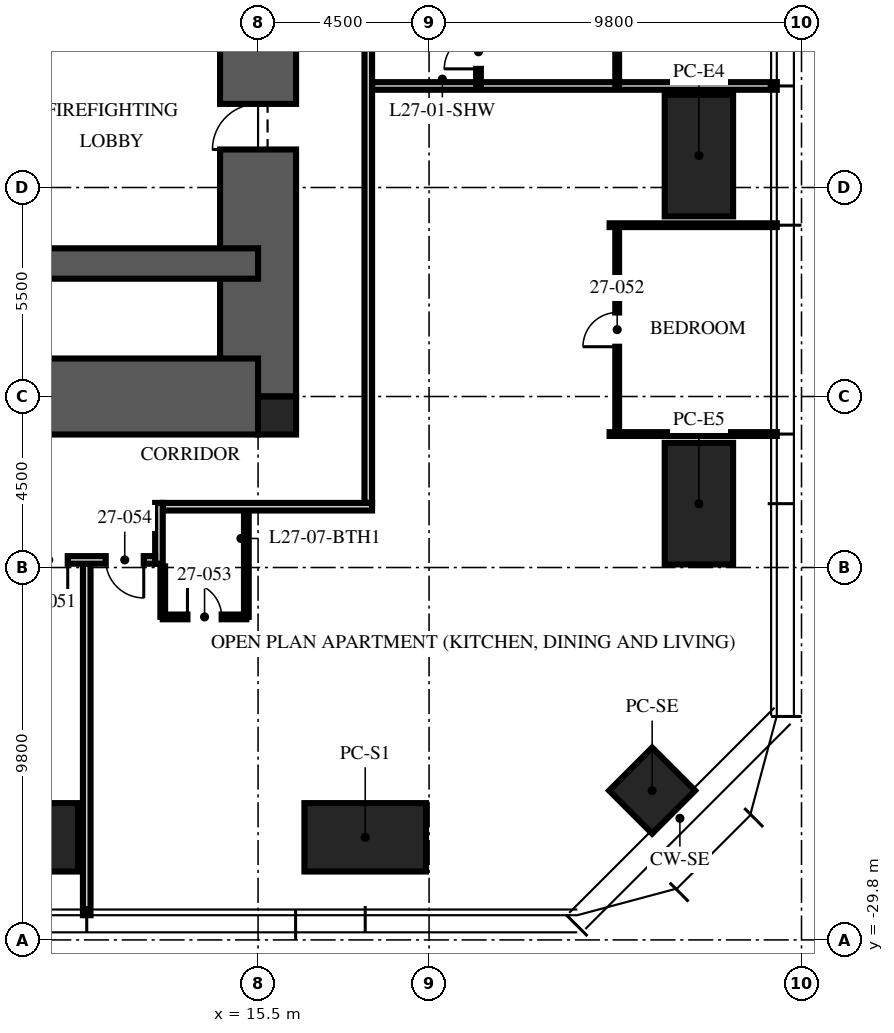
"""IFC4 building model, lengths in metres.
Left out: names, types, materials, properties, quantities, classifications, styles, units other than length and angle.
Written with IfcOpenShell. Run it as: python <this file> out.ifc"""

import sys

from ifc_helpers import new_model, si_unit, direction, frame, frame_2d, origin, origin_2d, place, context, subcontext, project, spatial, rectangle, hollow_rectangle, extrude, element, fill, save


model = new_model("IFC4")
c1 = context("Model", 3, precision=1e-05, world=origin(), true_north=direction((0.0, 1.0)))
c2 = subcontext(c1, "Body", "Model", "MODEL_VIEW")
j1 = project(units=[si_unit("LENGTHUNIT", "METRE"), si_unit("PLANEANGLEUNIT", "RADIAN")], contexts=[c1])
p1 = place(None, origin())
s1 = spatial("IfcSite", under=j1, at=p1, CompositionType="ELEMENT")
p2 = place(p1, origin())
s2 = spatial("IfcBuilding", under=s1, at=p2, CompositionType="ELEMENT")
p3 = place(p2, frame((0.0, 0.0, 111.0)))
s3 = spatial("IfcBuildingStorey", under=s2, at=p3, CompositionType="ELEMENT", Elevation=111.0)
p4 = place(p3, frame((15.5, -15.5, -0.25), z_axis=(0.0, 0.0, 1.0), x_axis=(0.0, 1.0, 0.0)))
e1 = element("IfcWall", 1, at=p4, inside=s3, PredefinedType="SHEAR", context=c2, shape_type="SweptSolid", body=[
    extrude(rectangle(XDim=31.0, YDim=2.0, at=frame_2d((15.5, 0.0))), origin(), (0.0, 0.0, 1.0), 3.75),
])
p5 = place(p4, frame((6.5, 0.0, 0.25)))
e2 = element("IfcOpeningElement", 2, at=p5, cuts=e1, PredefinedType="OPENING", context=c2, shape_type="SweptSolid", body=[
    extrude(rectangle(XDim=1.2, YDim=2.1, at=frame_2d((0.6, 1.05))), frame((0.0, 1.01, 0.0), z_axis=(0.0, -1.0, 0.0), x_axis=(1.0, 0.0, 0.0)), (0.0, 0.0, 1.0), 2.02),
])
p6 = place(p4, frame((23.0, 0.0, 0.25)))
e3 = element("IfcOpeningElement", 3, at=p6, cuts=e1, PredefinedType="OPENING", context=c2, shape_type="SweptSolid", body=[
    extrude(rectangle(XDim=1.8, YDim=2.1, at=frame_2d((0.9, 1.05))), frame((0.0, 1.01, 0.0), z_axis=(0.0, -1.0, 0.0), x_axis=(1.0, 0.0, 0.0)), (0.0, 0.0, 1.0), 2.02),
])
p7 = place(p3, frame((-15.5, -15.5, -0.25), z_axis=(0.0, 0.0, 1.0), x_axis=(1.0, 0.0, 0.0)))
e4 = element("IfcWall", 4, at=p7, inside=s3, PredefinedType="SHEAR", context=c2, shape_type="SweptSolid", body=[
    extrude(rectangle(XDim=31.0, YDim=2.0, at=frame_2d((15.5, 0.0))), origin(), (0.0, 0.0, 1.0), 3.75),
])
p8 = place(p7, frame((10.4, 0.0, 0.25)))
e5 = element("IfcOpeningElement", 5, at=p8, cuts=e4, PredefinedType="OPENING", context=c2, shape_type="SweptSolid", body=[
    extrude(rectangle(XDim=1.1, YDim=2.1, at=frame_2d((0.55, 1.05))), frame((0.0, 1.01, 0.0), z_axis=(0.0, -1.0, 0.0), x_axis=(1.0, 0.0, 0.0)), (0.0, 0.0, 1.0), 2.02),
])
p9 = place(p7, frame((13.5, 0.0, 0.25)))
e6 = element("IfcOpeningElement", 6, at=p9, cuts=e4, PredefinedType="OPENING", context=c2, shape_type="SweptSolid", body=[
    extrude(rectangle(XDim=1.1, YDim=2.1, at=frame_2d((0.55, 1.05))), frame((0.0, 1.01, 0.0), z_axis=(0.0, -1.0, 0.0), x_axis=(1.0, 0.0, 0.0)), (0.0, 0.0, 1.0), 2.02),
])
p10 = place(p7, frame((16.6, 0.0, 0.25)))
e7 = element("IfcOpeningElement", 7, at=p10, cuts=e4, PredefinedType="OPENING", context=c2, shape_type="SweptSolid", body=[
    extrude(rectangle(XDim=1.1, YDim=2.1, at=frame_2d((0.55, 1.05))), frame((0.0, 1.01, 0.0), z_axis=(0.0, -1.0, 0.0), x_axis=(1.0, 0.0, 0.0)), (0.0, 0.0, 1.0), 2.02),
])
p11 = place(p3, frame((-15.5, -12.0, -0.25), z_axis=(0.0, 0.0, 1.0), x_axis=(1.0, 0.0, 0.0)))
e8 = element("IfcWall", 8, at=p11, inside=s3, PredefinedType="SHEAR", context=c2, shape_type="SweptSolid", body=[
    extrude(rectangle(XDim=31.0, YDim=0.8, at=frame_2d((15.5, 0.0))), origin(), (0.0, 0.0, 1.0), 3.75),
])
p12 = place(p3, frame((16.0, -16.0, -0.25), z_axis=(0.0, 0.0, 1.0), x_axis=(1.0, 0.0, 0.0)))
e9 = element("IfcColumn", 9, at=p12, inside=s3, PredefinedType="COLUMN", context=c2, shape_type="SweptSolid", body=[
    extrude(rectangle(XDim=1.0, YDim=1.0, at=origin_2d()), origin(), (0.0, 0.0, 1.0), 3.75),
])
for number, where, z_axis, x_axis in (
    (10, (27.1, -9.16, 0.0), (0.0, 0.0, 1.0), (0.0, 1.0, 0.0)),
    (11, (27.1, -18.32, 0.0), (0.0, 0.0, 1.0), (0.0, 1.0, 0.0)),
    (12, (18.32, -27.1, 0.0), (0.0, 0.0, 1.0), (1.0, 0.0, 0.0)),
    (13, (9.16, -27.1, 0.0), (0.0, 0.0, 1.0), (1.0, 0.0, 0.0)),
):
    element("IfcColumn", number, at=place(p3, frame(where, z_axis=z_axis, x_axis=x_axis)), inside=s3, PredefinedType="COLUMN", context=c2, shape_type="SweptSolid", body=[
        extrude(hollow_rectangle(XDim=3.2, YDim=1.8, WallThickness=0.2, at=origin_2d()), origin(), (0.0, 0.0, 1.0), 3.75),
    ])
p13 = place(p3, frame((25.87, -25.87, 0.0), z_axis=(0.0, 0.0, 1.0), x_axis=(0.707106781187, 0.707106781187, 0.0)))
e14 = element("IfcColumn", 14, at=p13, inside=s3, PredefinedType="COLUMN", context=c2, shape_type="SweptSolid", body=[
    extrude(hollow_rectangle(XDim=1.6, YDim=1.6, WallThickness=0.1, at=origin_2d()), origin(), (0.0, 0.0, 1.0), 3.75),
])
p14 = place(p3, frame((18.5, -7.328, 0.0), z_axis=(0.0, 0.0, 1.0), x_axis=(1.0, 0.0, 0.0)))
e15 = element("IfcWall", 15, at=p14, inside=s3, PredefinedType="PARTITIONING", context=c2, shape_type="SweptSolid", body=[
    extrude(rectangle(XDim=10.65, YDim=0.2, at=frame_2d((5.325, 0.0))), origin(), (0.0, 0.0, 1.0), 2.81),
])
p15 = place(p3, frame((10.992, -19.9, 0.0), z_axis=(0.0, 0.0, 1.0), x_axis=(0.0, -1.0, 0.0)))
e16 = element("IfcWall", 16, at=p15, inside=s3, PredefinedType="PARTITIONING", context=c2, shape_type="SweptSolid", body=[
    extrude(rectangle(XDim=9.25, YDim=0.2, at=frame_2d((4.625, 0.0))), origin(), (0.0, 0.0, 1.0), 2.81),
])
for number, where, z_axis, x_axis in (
    (17, (24.75, -16.488, 0.0), (0.0, 0.0, 1.0), (1.0, 0.0, 0.0)),
    (18, (24.75, -10.992, 0.0), (0.0, 0.0, 1.0), (1.0, 0.0, 0.0)),
):
    element("IfcWall", number, at=place(p3, frame(where, z_axis=z_axis, x_axis=x_axis)), inside=s3, PredefinedType="PARTITIONING", context=c2, shape_type="SweptSolid", body=[
        extrude(rectangle(XDim=4.4, YDim=0.1, at=frame_2d((2.2, 0.0))), origin(), (0.0, 0.0, 1.0), 2.81),
    ])
p16 = place(p3, frame((24.95, -7.328, 0.0), z_axis=(0.0, 0.0, 1.0), x_axis=(0.0, 1.0, 0.0)))
e19 = element("IfcWall", 19, at=p16, inside=s3, PredefinedType="PARTITIONING", context=c2, shape_type="SweptSolid", body=[
    extrude(rectangle(XDim=5.496, YDim=0.1, at=frame_2d((2.748, 0.0))), origin(), (0.0, 0.0, 1.0), 2.81),
])
p17 = place(p16, frame((2.298, 0.0, 0.0)))
e20 = element("IfcOpeningElement", 20, at=p17, cuts=e19, PredefinedType="OPENING", context=c2, shape_type="SweptSolid", body=[
    extrude(rectangle(XDim=0.9, YDim=2.1, at=frame_2d((0.45, 1.05))), frame((0.0, 0.06, 0.0), z_axis=(0.0, -1.0, 0.0), x_axis=(1.0, 0.0, 0.0)), (0.0, 0.0, 1.0), 0.12),
])
p18 = place(p3, frame((21.3, -7.328, 0.0), z_axis=(0.0, 0.0, 1.0), x_axis=(0.0, 1.0, 0.0)))
e21 = element("IfcWall", 21, at=p18, inside=s3, PredefinedType="PARTITIONING", context=c2, shape_type="SweptSolid", body=[
    extrude(rectangle(XDim=1.8, YDim=0.125, at=frame_2d((0.9, 0.0))), origin(), (0.0, 0.0, 1.0), 3.5),
])
p19 = place(p18, frame((0.45, 0.0, 0.0)))
e22 = element("IfcOpeningElement", 22, at=p19, cuts=e21, PredefinedType="OPENING", context=c2, shape_type="SweptSolid", body=[
    extrude(rectangle(XDim=0.9, YDim=2.1, at=frame_2d((0.45, 1.05))), frame((0.0, 0.073, 0.0), z_axis=(0.0, -1.0, 0.0), x_axis=(1.0, 0.0, 0.0)), (0.0, 0.0, 1.0), 0.145),
])
p20 = place(p3, frame((24.95, -16.488, 0.0), z_axis=(0.0, 0.0, 1.0), x_axis=(0.0, 1.0, 0.0)))
e23 = element("IfcWall", 23, at=p20, inside=s3, PredefinedType="PARTITIONING", context=c2, shape_type="SweptSolid", body=[
    extrude(rectangle(XDim=5.496, YDim=0.1, at=frame_2d((2.748, 0.0))), origin(), (0.0, 0.0, 1.0), 2.81),
])
p21 = place(p20, frame((2.298, 0.0, 0.0)))
e24 = element("IfcOpeningElement", 24, at=p21, cuts=e23, PredefinedType="OPENING", context=c2, shape_type="SweptSolid", body=[
    extrude(rectangle(XDim=0.9, YDim=2.1, at=frame_2d((0.45, 1.05))), frame((0.0, 0.06, 0.0), z_axis=(0.0, -1.0, 0.0), x_axis=(1.0, 0.0, 0.0)), (0.0, 0.0, 1.0), 0.12),
])
p22 = place(p3, frame((12.992, -21.3, 0.0), z_axis=(0.0, 0.0, 1.0), x_axis=(1.0, 0.0, 0.0)))
e25 = element("IfcWall", 25, at=p22, inside=s3, PredefinedType="PARTITIONING", context=c2, shape_type="SweptSolid", body=[
    extrude(rectangle(XDim=2.2, YDim=0.125, at=frame_2d((1.1, 0.0))), origin(), (0.0, 0.0, 1.0), 2.81),
])
p23 = place(p22, frame((0.65, 0.0, 0.0)))
e26 = element("IfcOpeningElement", 26, at=p23, cuts=e25, PredefinedType="OPENING", context=c2, shape_type="SweptSolid", body=[
    extrude(rectangle(XDim=0.9, YDim=2.1, at=frame_2d((0.45, 1.05))), frame((0.0, 0.073, 0.0), z_axis=(0.0, -1.0, 0.0), x_axis=(1.0, 0.0, 0.0)), (0.0, 0.0, 1.0), 0.145),
])
p24 = place(p3, frame((12.992, -19.97, 0.0), z_axis=(0.0, 0.0, 1.0), x_axis=(0.0, -1.0, 0.0)))
e27 = element("IfcWall", 27, at=p24, inside=s3, PredefinedType="PARTITIONING", context=c2, shape_type="SweptSolid", body=[
    extrude(rectangle(XDim=1.33, YDim=0.125, at=frame_2d((0.665, 0.0))), origin(), (0.0, 0.0, 1.0), 3.5),
])
p25 = place(p3, frame((15.192, -18.5, 0.0), z_axis=(0.0, 0.0, 1.0), x_axis=(0.0, -1.0, 0.0)))
e28 = element("IfcWall", 28, at=p25, inside=s3, PredefinedType="PARTITIONING", context=c2, shape_type="SweptSolid", body=[
    extrude(rectangle(XDim=2.8, YDim=0.125, at=frame_2d((1.4, 0.0))), origin(), (0.0, 0.0, 1.0), 3.5),
])
p26 = place(p3, frame((18.4, -18.3, 0.0), z_axis=(0.0, 0.0, 1.0), x_axis=(0.0, 1.0, 0.0)))
e29 = element("IfcWall", 29, at=p26, inside=s3, PredefinedType="PARTITIONING", context=c2, shape_type="SweptSolid", body=[
    extrude(rectangle(XDim=27.292, YDim=0.2, at=frame_2d((13.646, 0.0))), origin(), (0.0, 0.0, 1.0), 2.3),
])
p27 = place(p3, frame((18.5, -18.4, 0.0), z_axis=(0.0, 0.0, 1.0), x_axis=(-1.0, 0.0, 0.0)))
e30 = element("IfcWall", 30, at=p27, inside=s3, PredefinedType="PARTITIONING", context=c2, shape_type="SweptSolid", body=[
    extrude(rectangle(XDim=5.508, YDim=0.2, at=frame_2d((2.754, 0.0))), origin(), (0.0, 0.0, 1.0), 2.3),
])
p28 = place(p3, frame((12.892, -18.3, 0.0), z_axis=(0.0, 0.0, 1.0), x_axis=(0.0, -1.0, 0.0)))
e31 = element("IfcWall", 31, at=p28, inside=s3, PredefinedType="PARTITIONING", context=c2, shape_type="SweptSolid", body=[
    extrude(rectangle(XDim=1.6, YDim=0.2, at=frame_2d((0.8, 0.0))), origin(), (0.0, 0.0, 1.0), 3.5),
])
p29 = place(p3, frame((12.792, -19.8, 0.0), z_axis=(0.0, 0.0, 1.0), x_axis=(-1.0, 0.0, 0.0)))
e32 = element("IfcWall", 32, at=p29, inside=s3, PredefinedType="PARTITIONING", context=c2, shape_type="SweptSolid", body=[
    extrude(rectangle(XDim=3.6, YDim=0.2, at=frame_2d((1.8, 0.0))), origin(), (0.0, 0.0, 1.0), 2.7),
])
p30 = place(p29, frame((2.3, 0.0, 0.0)))
e33 = element("IfcOpeningElement", 33, at=p30, cuts=e32, PredefinedType="OPENING", context=c2, shape_type="SweptSolid", body=[
    extrude(rectangle(XDim=1.0, YDim=2.2, at=frame_2d((0.5, 1.1))), frame((0.0, 0.11, 0.0), z_axis=(0.0, -1.0, 0.0), x_axis=(1.0, 0.0, 0.0)), (0.0, 0.0, 1.0), 0.22),
])
p31 = place(p29, frame((0.3, 0.0, 0.0)))
e34 = element("IfcOpeningElement", 34, at=p31, cuts=e32, PredefinedType="OPENING", context=c2, shape_type="SweptSolid", body=[
    extrude(rectangle(XDim=1.0, YDim=2.2, at=frame_2d((0.5, 1.1))), frame((0.0, 0.11, 0.0), z_axis=(0.0, -1.0, 0.0), x_axis=(1.0, 0.0, 0.0)), (0.0, 0.0, 1.0), 0.22),
])
p32 = place(p5, origin())
e35 = element("IfcDoor", 35, at=p32, inside=s3, OperationType="SINGLE_SWING_LEFT", PredefinedType="DOOR", context=c2, shape_type="SweptSolid", body=[
    extrude(rectangle(XDim=1.2, YDim=2.1, at=frame_2d((0.6, 1.05))), frame((0.0, 0.025, 0.0), z_axis=(0.0, -1.0, 0.0), x_axis=(1.0, 0.0, 0.0)), (0.0, 0.0, 1.0), 0.05),
])
fill(e2, e35)
p33 = place(p19, origin())
e36 = element("IfcDoor", 36, at=p33, inside=s3, OperationType="SINGLE_SWING_LEFT", PredefinedType="DOOR", context=c2, shape_type="SweptSolid", body=[
    extrude(rectangle(XDim=0.9, YDim=2.1, at=frame_2d((0.45, 1.05))), frame((0.0, 0.025, 0.0), z_axis=(0.0, -1.0, 0.0), x_axis=(1.0, 0.0, 0.0)), (0.0, 0.0, 1.0), 0.05),
])
fill(e22, e36)
p34 = place(p30, origin())
e37 = element("IfcDoor", 37, at=p34, inside=s3, OperationType="SINGLE_SWING_LEFT", PredefinedType="DOOR", context=c2, shape_type="SweptSolid", body=[
    extrude(rectangle(XDim=1.0, YDim=2.2, at=frame_2d((0.5, 1.1))), frame((0.0, 0.025, 0.0), z_axis=(0.0, -1.0, 0.0), x_axis=(1.0, 0.0, 0.0)), (0.0, 0.0, 1.0), 0.05),
])
fill(e33, e37)
p35 = place(p21, origin())
e38 = element("IfcDoor", 38, at=p35, inside=s3, OperationType="SINGLE_SWING_LEFT", PredefinedType="DOOR", context=c2, shape_type="SweptSolid", body=[
    extrude(rectangle(XDim=0.9, YDim=2.1, at=frame_2d((0.45, 1.05))), frame((0.0, 0.025, 0.0), z_axis=(0.0, -1.0, 0.0), x_axis=(1.0, 0.0, 0.0)), (0.0, 0.0, 1.0), 0.05),
])
fill(e24, e38)
p36 = place(p23, origin())
e39 = element("IfcDoor", 39, at=p36, inside=s3, OperationType="SINGLE_SWING_LEFT", PredefinedType="DOOR", context=c2, shape_type="SweptSolid", body=[
    extrude(rectangle(XDim=0.9, YDim=2.1, at=frame_2d((0.45, 1.05))), frame((0.0, 0.025, 0.0), z_axis=(0.0, -1.0, 0.0), x_axis=(1.0, 0.0, 0.0)), (0.0, 0.0, 1.0), 0.05),
])
fill(e26, e39)
p37 = place(p31, origin())
e40 = element("IfcDoor", 40, at=p37, inside=s3, OperationType="SINGLE_SWING_LEFT", PredefinedType="DOOR", context=c2, shape_type="SweptSolid", body=[
    extrude(rectangle(XDim=1.0, YDim=2.2, at=frame_2d((0.5, 1.1))), frame((0.0, 0.025, 0.0), z_axis=(0.0, -1.0, 0.0), x_axis=(1.0, 0.0, 0.0)), (0.0, 0.0, 1.0), 0.05),
])
fill(e34, e40)
save(model, sys.argv[1])
